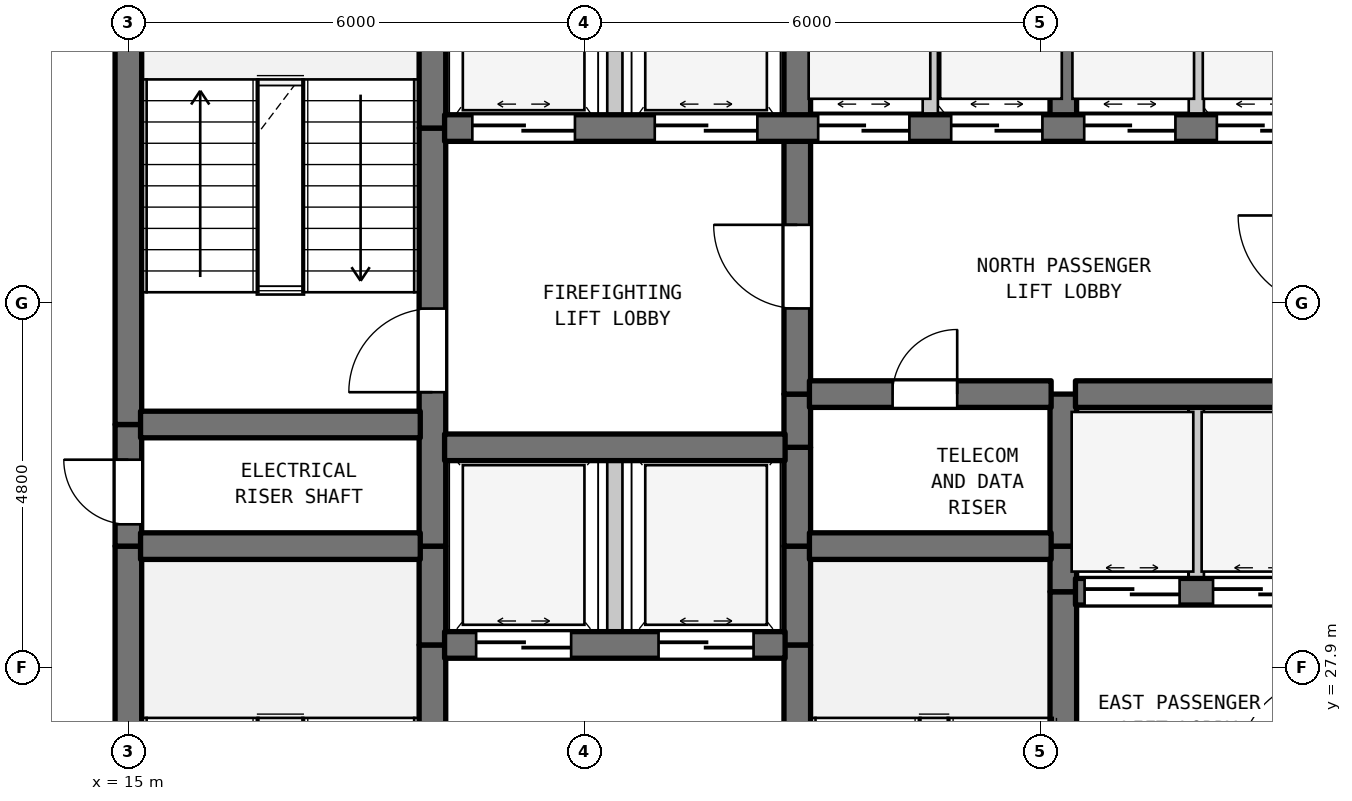
"""IFC4 building model, lengths in metres.
Left out: names, types, materials, properties, quantities, classifications, styles, units other than length and angle.
Written with IfcOpenShell. Run it as: python <this file> out.ifc"""

import sys

from ifc_helpers import new_model, si_unit, direction, frame, frame_2d, origin, place, context, subcontext, project, spatial, rectangle, extrude, element, fill, save


model = new_model("IFC4")
c1 = context("Model", 3, precision=1e-05, world=origin(), true_north=direction((0.0, 1.0)))
c2 = subcontext(c1, "Body", "Model", "MODEL_VIEW")
j1 = project(units=[si_unit("LENGTHUNIT", "METRE"), si_unit("PLANEANGLEUNIT", "RADIAN")], contexts=[c1])
p1 = place(None, origin())
s1 = spatial("IfcSite", under=j1, at=p1, CompositionType="ELEMENT")
p2 = place(p1, origin())
s2 = spatial("IfcBuilding", under=s1, at=p2, CompositionType="ELEMENT")
p3 = place(p2, frame((0.0, 0.0, 57.3)))
s3 = spatial("IfcBuildingStorey", under=s2, at=p3, CompositionType="ELEMENT", Elevation=57.3)
p4 = place(p3, frame((15.0, 22.7, 0.0), z_axis=(0.0, 0.0, 1.0), x_axis=(0.0, 1.0, 0.0)))
e1 = element("IfcWall", 1, at=p4, inside=s3, PredefinedType="SHEAR", context=c2, shape_type="SweptSolid", body=[
    extrude(rectangle(XDim=6.8, YDim=0.35, at=frame_2d((3.4, 0.0))), origin(), (0.0, 0.0, 1.0), 3.28),
])
p5 = place(p3, frame((15.0, 29.5, 0.0), z_axis=(0.0, 0.0, 1.0), x_axis=(0.0, 1.0, 0.0)))
e2 = element("IfcWall", 2, at=p5, inside=s3, PredefinedType="SHEAR", context=c2, shape_type="SweptSolid", body=[
    extrude(rectangle(XDim=1.6, YDim=0.35, at=frame_2d((0.8, 0.0))), origin(), (0.0, 0.0, 1.0), 3.28),
])
p6 = place(p5, frame((0.287, 0.0, 0.0)))
e3 = element("IfcOpeningElement", 3, at=p6, cuts=e2, PredefinedType="OPENING", context=c2, shape_type="SweptSolid", body=[
    extrude(rectangle(XDim=0.85, YDim=2.1, at=frame_2d((0.425, 1.05))), frame((0.0, 0.185, 0.0), z_axis=(0.0, -1.0, 0.0), x_axis=(1.0, 0.0, 0.0)), (0.0, 0.0, 1.0), 0.37),
])
p7 = place(p3, frame((15.0, 31.1, 0.0), z_axis=(0.0, 0.0, 1.0), x_axis=(0.0, 1.0, 0.0)))
e4 = element("IfcWall", 4, at=p7, inside=s3, PredefinedType="SHEAR", context=c2, shape_type="SweptSolid", body=[
    extrude(rectangle(XDim=6.8, YDim=0.35, at=frame_2d((3.4, 0.0))), origin(), (0.0, 0.0, 1.0), 3.28),
])
p8 = place(p3, frame((19.0, 22.7, 0.0), z_axis=(0.0, 0.0, 1.0), x_axis=(0.0, 1.0, 0.0)))
e5 = element("IfcWall", 5, at=p8, inside=s3, PredefinedType="SHEAR", context=c2, shape_type="SweptSolid", body=[
    extrude(rectangle(XDim=5.5, YDim=0.35, at=frame_2d((2.75, 0.0))), origin(), (0.0, 0.0, 1.0), 3.28),
])
p9 = place(p8, frame((0.631, 0.0, 0.0)))
e6 = element("IfcOpeningElement", 6, at=p9, cuts=e5, PredefinedType="OPENING", context=c2, shape_type="SweptSolid", body=[
    extrude(rectangle(XDim=1.1, YDim=2.15, at=frame_2d((0.55, 1.075))), frame((0.0, 0.185, 0.0), z_axis=(0.0, -1.0, 0.0), x_axis=(1.0, 0.0, 0.0)), (0.0, 0.0, 1.0), 0.37),
])
p10 = place(p3, frame((19.0, 28.2, 0.0), z_axis=(0.0, 0.0, 1.0), x_axis=(0.0, 1.0, 0.0)))
e7 = element("IfcWall", 7, at=p10, inside=s3, PredefinedType="SHEAR", context=c2, shape_type="SweptSolid", body=[
    extrude(rectangle(XDim=1.3, YDim=0.35, at=frame_2d((0.65, 0.0))), origin(), (0.0, 0.0, 1.0), 3.28),
])
p11 = place(p3, frame((19.0, 29.5, 0.0), z_axis=(0.0, 0.0, 1.0), x_axis=(0.0, 1.0, 0.0)))
e8 = element("IfcWall", 8, at=p11, inside=s3, PredefinedType="SHEAR", context=c2, shape_type="SweptSolid", body=[
    extrude(rectangle(XDim=5.5, YDim=0.35, at=frame_2d((2.75, 0.0))), origin(), (0.0, 0.0, 1.0), 3.28),
])
p12 = place(p11, frame((2.025, 0.0, 0.0)))
e9 = element("IfcOpeningElement", 9, at=p12, cuts=e8, PredefinedType="OPENING", context=c2, shape_type="SweptSolid", body=[
    extrude(rectangle(XDim=1.1, YDim=2.15, at=frame_2d((0.55, 1.075))), frame((0.0, 0.185, 0.0), z_axis=(0.0, -1.0, 0.0), x_axis=(1.0, 0.0, 0.0)), (0.0, 0.0, 1.0), 0.37),
])
p13 = place(p3, frame((19.0, 35.0, 0.0), z_axis=(0.0, 0.0, 1.0), x_axis=(0.0, 1.0, 0.0)))
e10 = element("IfcWall", 10, at=p13, inside=s3, PredefinedType="SHEAR", context=c2, shape_type="SweptSolid", body=[
    extrude(rectangle(XDim=2.9, YDim=0.35, at=frame_2d((1.45, 0.0))), origin(), (0.0, 0.0, 1.0), 3.28),
])
p14 = place(p3, frame((21.4, 28.2, 0.0), z_axis=(0.0, 0.0, 1.0), x_axis=(0.0, 1.0, 0.0)))
e11 = element("IfcWall", 11, at=p14, inside=s3, PredefinedType="STANDARD", context=c2, shape_type="SweptSolid", body=[
    extrude(rectangle(XDim=2.6, YDim=0.2, at=frame_2d((1.3, 0.0))), origin(), (0.0, 0.0, 1.0), 3.28),
])
p15 = place(p3, frame((21.4, 35.0, 0.0), z_axis=(0.0, 0.0, 1.0), x_axis=(0.0, 1.0, 0.0)))
e12 = element("IfcWall", 12, at=p15, inside=s3, PredefinedType="STANDARD", context=c2, shape_type="SweptSolid", body=[
    extrude(rectangle(XDim=2.9, YDim=0.2, at=frame_2d((1.45, 0.0))), origin(), (0.0, 0.0, 1.0), 3.28),
])
p16 = place(p3, frame((23.8, 22.7, 0.0), z_axis=(0.0, 0.0, 1.0), x_axis=(0.0, 1.0, 0.0)))
e13 = element("IfcWall", 13, at=p16, inside=s3, PredefinedType="SHEAR", context=c2, shape_type="SweptSolid", body=[
    extrude(rectangle(XDim=5.5, YDim=0.35, at=frame_2d((2.75, 0.0))), origin(), (0.0, 0.0, 1.0), 3.28),
])
p17 = place(p16, frame((0.235, 0.0, 0.0)))
e14 = element("IfcOpeningElement", 14, at=p17, cuts=e13, PredefinedType="OPENING", context=c2, shape_type="SweptSolid", body=[
    extrude(rectangle(XDim=1.1, YDim=2.15, at=frame_2d((0.55, 1.075))), frame((0.0, 0.185, 0.0), z_axis=(0.0, -1.0, 0.0), x_axis=(1.0, 0.0, 0.0)), (0.0, 0.0, 1.0), 0.37),
])
for number, where, z_axis, x_axis in (
    (15, (23.8, 28.2, 0.0), (0.0, 0.0, 1.0), (0.0, 1.0, 0.0)),
    (16, (23.8, 29.5, 0.0), (0.0, 0.0, 1.0), (0.0, 1.0, 0.0)),
):
    element("IfcWall", number, at=place(p3, frame(where, z_axis=z_axis, x_axis=x_axis)), inside=s3, PredefinedType="SHEAR", context=c2, shape_type="SweptSolid", body=[
        extrude(rectangle(XDim=1.3, YDim=0.35, at=frame_2d((0.65, 0.0))), origin(), (0.0, 0.0, 1.0), 3.28),
    ])
p18 = place(p3, frame((23.8, 30.8, 0.0), z_axis=(0.0, 0.0, 1.0), x_axis=(0.0, 1.0, 0.0)))
e17 = element("IfcWall", 17, at=p18, inside=s3, PredefinedType="SHEAR", context=c2, shape_type="SweptSolid", body=[
    extrude(rectangle(XDim=0.7, YDim=0.35, at=frame_2d((0.35, 0.0))), origin(), (0.0, 0.0, 1.0), 3.28),
])
p19 = place(p3, frame((23.8, 31.5, 0.0), z_axis=(0.0, 0.0, 1.0), x_axis=(0.0, 1.0, 0.0)))
e18 = element("IfcWall", 18, at=p19, inside=s3, PredefinedType="SHEAR", context=c2, shape_type="SweptSolid", body=[
    extrude(rectangle(XDim=3.5, YDim=0.35, at=frame_2d((1.75, 0.0))), origin(), (0.0, 0.0, 1.0), 3.28),
])
p20 = place(p19, frame((1.127, 0.0, 0.0)))
e19 = element("IfcOpeningElement", 19, at=p20, cuts=e18, PredefinedType="OPENING", context=c2, shape_type="SweptSolid", body=[
    extrude(rectangle(XDim=1.1, YDim=2.15, at=frame_2d((0.55, 1.075))), frame((0.0, 0.185, 0.0), z_axis=(0.0, -1.0, 0.0), x_axis=(1.0, 0.0, 0.0)), (0.0, 0.0, 1.0), 0.37),
])
p21 = place(p3, frame((23.8, 35.0, 0.0), z_axis=(0.0, 0.0, 1.0), x_axis=(0.0, 1.0, 0.0)))
e20 = element("IfcWall", 20, at=p21, inside=s3, PredefinedType="SHEAR", context=c2, shape_type="SweptSolid", body=[
    extrude(rectangle(XDim=2.9, YDim=0.35, at=frame_2d((1.45, 0.0))), origin(), (0.0, 0.0, 1.0), 3.28),
])
p22 = place(p3, frame((25.55, 35.0, 0.0), z_axis=(0.0, 0.0, 1.0), x_axis=(0.0, 1.0, 0.0)))
e21 = element("IfcWall", 21, at=p22, inside=s3, PredefinedType="STANDARD", context=c2, shape_type="SweptSolid", body=[
    extrude(rectangle(XDim=2.9, YDim=0.2, at=frame_2d((1.45, 0.0))), origin(), (0.0, 0.0, 1.0), 3.28),
])
p23 = place(p3, frame((27.3, 25.6, 0.0), z_axis=(0.0, 0.0, 1.0), x_axis=(0.0, 1.0, 0.0)))
e22 = element("IfcWall", 22, at=p23, inside=s3, PredefinedType="SHEAR", context=c2, shape_type="SweptSolid", body=[
    extrude(rectangle(XDim=3.3, YDim=0.35, at=frame_2d((1.65, 0.0))), origin(), (0.0, 0.0, 1.0), 3.28),
])
p24 = place(p3, frame((27.3, 28.9, 0.0), z_axis=(0.0, 0.0, 1.0), x_axis=(0.0, 1.0, 0.0)))
e23 = element("IfcWall", 23, at=p24, inside=s3, PredefinedType="SHEAR", context=c2, shape_type="SweptSolid", body=[
    extrude(rectangle(XDim=0.6, YDim=0.35, at=frame_2d((0.3, 0.0))), origin(), (0.0, 0.0, 1.0), 3.28),
])
p25 = place(p3, frame((27.3, 29.5, 0.0), z_axis=(0.0, 0.0, 1.0), x_axis=(0.0, 1.0, 0.0)))
e24 = element("IfcWall", 24, at=p25, inside=s3, PredefinedType="SHEAR", context=c2, shape_type="SweptSolid", body=[
    extrude(rectangle(XDim=2.0, YDim=0.35, at=frame_2d((1.0, 0.0))), origin(), (0.0, 0.0, 1.0), 3.28),
])
p26 = place(p3, frame((27.3, 35.0, 0.0), z_axis=(0.0, 0.0, 1.0), x_axis=(0.0, 1.0, 0.0)))
e25 = element("IfcWall", 25, at=p26, inside=s3, PredefinedType="SHEAR", context=c2, shape_type="SweptSolid", body=[
    extrude(rectangle(XDim=2.9, YDim=0.35, at=frame_2d((1.45, 0.0))), origin(), (0.0, 0.0, 1.0), 3.28),
])
p27 = place(p3, frame((29.05, 28.9, 0.0), z_axis=(0.0, 0.0, 1.0), x_axis=(0.0, 1.0, 0.0)))
e26 = element("IfcWall", 26, at=p27, inside=s3, PredefinedType="STANDARD", context=c2, shape_type="SweptSolid", body=[
    extrude(rectangle(XDim=2.6, YDim=0.2, at=frame_2d((1.3, 0.0))), origin(), (0.0, 0.0, 1.0), 3.28),
])
p28 = place(p3, frame((29.05, 35.0, 0.0), z_axis=(0.0, 0.0, 1.0), x_axis=(0.0, 1.0, 0.0)))
e27 = element("IfcWall", 27, at=p28, inside=s3, PredefinedType="STANDARD", context=c2, shape_type="SweptSolid", body=[
    extrude(rectangle(XDim=2.9, YDim=0.2, at=frame_2d((1.45, 0.0))), origin(), (0.0, 0.0, 1.0), 3.28),
])
p29 = place(p3, frame((19.16, 28.2, 0.0), z_axis=(0.0, 0.0, 1.0), x_axis=(1.0, 0.0, 0.0)))
e28 = element("IfcWall", 28, at=p29, inside=s3, PredefinedType="SHEAR", context=c2, shape_type="SweptSolid", body=[
    extrude(rectangle(XDim=4.48, YDim=0.35, at=frame_2d((2.24, 0.0))), origin(), (0.0, 0.0, 1.0), 3.28),
])
p30 = place(p29, frame((0.415, 0.0, 0.0)))
e29 = element("IfcOpeningElement", 29, at=p30, cuts=e28, PredefinedType="OPENING", context=c2, shape_type="SweptSolid", body=[
    extrude(rectangle(XDim=1.25, YDim=2.2, at=frame_2d((0.625, 1.1))), frame((0.0, 0.185, 0.0), z_axis=(0.0, -1.0, 0.0), x_axis=(1.0, 0.0, 0.0)), (0.0, 0.0, 1.0), 0.37),
])
p31 = place(p29, frame((2.815, 0.0, 0.0)))
e30 = element("IfcOpeningElement", 30, at=p31, cuts=e28, PredefinedType="OPENING", context=c2, shape_type="SweptSolid", body=[
    extrude(rectangle(XDim=1.25, YDim=2.2, at=frame_2d((0.625, 1.1))), frame((0.0, 0.185, 0.0), z_axis=(0.0, -1.0, 0.0), x_axis=(1.0, 0.0, 0.0)), (0.0, 0.0, 1.0), 0.37),
])
p32 = place(p3, frame((27.46, 28.9, 0.0), z_axis=(0.0, 0.0, 1.0), x_axis=(1.0, 0.0, 0.0)))
e31 = element("IfcWall", 31, at=p32, inside=s3, PredefinedType="SHEAR", context=c2, shape_type="SweptSolid", body=[
    extrude(rectangle(XDim=3.18, YDim=0.35, at=frame_2d((1.59, 0.0))), origin(), (0.0, 0.0, 1.0), 3.28),
])
p33 = place(p32, frame((0.12, 0.0, 0.0)))
e32 = element("IfcOpeningElement", 32, at=p33, cuts=e31, PredefinedType="OPENING", context=c2, shape_type="SweptSolid", body=[
    extrude(rectangle(XDim=1.25, YDim=2.2, at=frame_2d((0.625, 1.1))), frame((0.0, 0.185, 0.0), z_axis=(0.0, -1.0, 0.0), x_axis=(1.0, 0.0, 0.0)), (0.0, 0.0, 1.0), 0.37),
])
p34 = place(p32, frame((1.81, 0.0, 0.0)))
e33 = element("IfcOpeningElement", 33, at=p34, cuts=e31, PredefinedType="OPENING", context=c2, shape_type="SweptSolid", body=[
    extrude(rectangle(XDim=1.25, YDim=2.2, at=frame_2d((0.625, 1.1))), frame((0.0, 0.185, 0.0), z_axis=(0.0, -1.0, 0.0), x_axis=(1.0, 0.0, 0.0)), (0.0, 0.0, 1.0), 0.37),
])
p35 = place(p3, frame((15.16, 29.5, 0.0), z_axis=(0.0, 0.0, 1.0), x_axis=(1.0, 0.0, 0.0)))
e34 = element("IfcWall", 34, at=p35, inside=s3, PredefinedType="SHEAR", context=c2, shape_type="SweptSolid", body=[
    extrude(rectangle(XDim=3.68, YDim=0.35, at=frame_2d((1.84, 0.0))), origin(), (0.0, 0.0, 1.0), 3.28),
])
p36 = place(p3, frame((23.96, 29.5, 0.0), z_axis=(0.0, 0.0, 1.0), x_axis=(1.0, 0.0, 0.0)))
e35 = element("IfcWall", 35, at=p36, inside=s3, PredefinedType="SHEAR", context=c2, shape_type="SweptSolid", body=[
    extrude(rectangle(XDim=3.18, YDim=0.35, at=frame_2d((1.59, 0.0))), origin(), (0.0, 0.0, 1.0), 3.28),
])
p37 = place(p3, frame((19.16, 30.8, 0.0), z_axis=(0.0, 0.0, 1.0), x_axis=(1.0, 0.0, 0.0)))
e36 = element("IfcWall", 36, at=p37, inside=s3, PredefinedType="SHEAR", context=c2, shape_type="SweptSolid", body=[
    extrude(rectangle(XDim=4.48, YDim=0.35, at=frame_2d((2.24, 0.0))), origin(), (0.0, 0.0, 1.0), 3.28),
])
p38 = place(p3, frame((15.16, 31.1, 0.0), z_axis=(0.0, 0.0, 1.0), x_axis=(1.0, 0.0, 0.0)))
e37 = element("IfcWall", 37, at=p38, inside=s3, PredefinedType="SHEAR", context=c2, shape_type="SweptSolid", body=[
    extrude(rectangle(XDim=3.68, YDim=0.35, at=frame_2d((1.84, 0.0))), origin(), (0.0, 0.0, 1.0), 3.28),
])
p39 = place(p3, frame((23.96, 31.5, 0.0), z_axis=(0.0, 0.0, 1.0), x_axis=(1.0, 0.0, 0.0)))
e38 = element("IfcWall", 38, at=p39, inside=s3, PredefinedType="SHEAR", context=c2, shape_type="SweptSolid", body=[
    extrude(rectangle(XDim=3.18, YDim=0.35, at=frame_2d((1.59, 0.0))), origin(), (0.0, 0.0, 1.0), 3.28),
])
p40 = place(p39, frame((1.094, 0.0, 0.0)))
e39 = element("IfcOpeningElement", 39, at=p40, cuts=e38, PredefinedType="OPENING", context=c2, shape_type="SweptSolid", body=[
    extrude(rectangle(XDim=0.85, YDim=2.1, at=frame_2d((0.425, 1.05))), frame((0.0, 0.185, 0.0), z_axis=(0.0, -1.0, 0.0), x_axis=(1.0, 0.0, 0.0)), (0.0, 0.0, 1.0), 0.37),
])
p41 = place(p3, frame((27.46, 31.5, 0.0), z_axis=(0.0, 0.0, 1.0), x_axis=(1.0, 0.0, 0.0)))
e40 = element("IfcWall", 40, at=p41, inside=s3, PredefinedType="SHEAR", context=c2, shape_type="SweptSolid", body=[
    extrude(rectangle(XDim=3.18, YDim=0.35, at=frame_2d((1.59, 0.0))), origin(), (0.0, 0.0, 1.0), 3.28),
])
p42 = place(p3, frame((19.16, 35.0, 0.0), z_axis=(0.0, 0.0, 1.0), x_axis=(1.0, 0.0, 0.0)))
e41 = element("IfcWall", 41, at=p42, inside=s3, PredefinedType="SHEAR", context=c2, shape_type="SweptSolid", body=[
    extrude(rectangle(XDim=11.48, YDim=0.35, at=frame_2d((5.74, 0.0))), origin(), (0.0, 0.0, 1.0), 3.28),
])
p43 = place(p42, frame((0.365, 0.0, 0.0)))
e42 = element("IfcOpeningElement", 42, at=p43, cuts=e41, PredefinedType="OPENING", context=c2, shape_type="SweptSolid", body=[
    extrude(rectangle(XDim=1.35, YDim=2.2, at=frame_2d((0.675, 1.1))), frame((0.0, 0.185, 0.0), z_axis=(0.0, -1.0, 0.0), x_axis=(1.0, 0.0, 0.0)), (0.0, 0.0, 1.0), 0.37),
])
p44 = place(p42, frame((2.765, 0.0, 0.0)))
e43 = element("IfcOpeningElement", 43, at=p44, cuts=e41, PredefinedType="OPENING", context=c2, shape_type="SweptSolid", body=[
    extrude(rectangle(XDim=1.35, YDim=2.2, at=frame_2d((0.675, 1.1))), frame((0.0, 0.185, 0.0), z_axis=(0.0, -1.0, 0.0), x_axis=(1.0, 0.0, 0.0)), (0.0, 0.0, 1.0), 0.37),
])
p45 = place(p42, frame((4.915, 0.0, 0.0)))
e44 = element("IfcOpeningElement", 44, at=p45, cuts=e41, PredefinedType="OPENING", context=c2, shape_type="SweptSolid", body=[
    extrude(rectangle(XDim=1.2, YDim=2.2, at=frame_2d((0.6, 1.1))), frame((0.0, 0.185, 0.0), z_axis=(0.0, -1.0, 0.0), x_axis=(1.0, 0.0, 0.0)), (0.0, 0.0, 1.0), 0.37),
])
p46 = place(p42, frame((6.665, 0.0, 0.0)))
e45 = element("IfcOpeningElement", 45, at=p46, cuts=e41, PredefinedType="OPENING", context=c2, shape_type="SweptSolid", body=[
    extrude(rectangle(XDim=1.2, YDim=2.2, at=frame_2d((0.6, 1.1))), frame((0.0, 0.185, 0.0), z_axis=(0.0, -1.0, 0.0), x_axis=(1.0, 0.0, 0.0)), (0.0, 0.0, 1.0), 0.37),
])
p47 = place(p42, frame((8.415, 0.0, 0.0)))
e46 = element("IfcOpeningElement", 46, at=p47, cuts=e41, PredefinedType="OPENING", context=c2, shape_type="SweptSolid", body=[
    extrude(rectangle(XDim=1.2, YDim=2.2, at=frame_2d((0.6, 1.1))), frame((0.0, 0.185, 0.0), z_axis=(0.0, -1.0, 0.0), x_axis=(1.0, 0.0, 0.0)), (0.0, 0.0, 1.0), 0.37),
])
p48 = place(p42, frame((10.16, 0.0, 0.0)))
e47 = element("IfcOpeningElement", 47, at=p48, cuts=e41, PredefinedType="OPENING", context=c2, shape_type="SweptSolid", body=[
    extrude(rectangle(XDim=1.2, YDim=2.2, at=frame_2d((0.6, 1.1))), frame((0.0, 0.185, 0.0), z_axis=(0.0, -1.0, 0.0), x_axis=(1.0, 0.0, 0.0)), (0.0, 0.0, 1.0), 0.37),
])
p49 = place(p6, origin())
e48 = element("IfcDoor", 48, at=p49, inside=s3, OperationType="SINGLE_SWING_RIGHT", PredefinedType="DOOR", context=c2, shape_type="SweptSolid", body=[
    extrude(rectangle(XDim=0.85, YDim=2.1, at=frame_2d((0.425, 1.05))), frame((0.0, 0.025, 0.0), z_axis=(0.0, -1.0, 0.0), x_axis=(1.0, 0.0, 0.0)), (0.0, 0.0, 1.0), 0.05),
])
fill(e3, e48)
p50 = place(p12, origin())
e49 = element("IfcDoor", 49, at=p50, inside=s3, OperationType="SINGLE_SWING_LEFT", PredefinedType="DOOR", context=c2, shape_type="SweptSolid", body=[
    extrude(rectangle(XDim=1.1, YDim=2.15, at=frame_2d((0.55, 1.075))), frame((0.0, 0.025, 0.0), z_axis=(0.0, -1.0, 0.0), x_axis=(1.0, 0.0, 0.0)), (0.0, 0.0, 1.0), 0.05),
])
fill(e9, e49)
p51 = place(p20, origin())
e50 = element("IfcDoor", 50, at=p51, inside=s3, OperationType="SINGLE_SWING_RIGHT", PredefinedType="DOOR", context=c2, shape_type="SweptSolid", body=[
    extrude(rectangle(XDim=1.1, YDim=2.15, at=frame_2d((0.55, 1.075))), frame((0.0, 0.025, 0.0), z_axis=(0.0, -1.0, 0.0), x_axis=(1.0, 0.0, 0.0)), (0.0, 0.0, 1.0), 0.05),
])
fill(e19, e50)
p52 = place(p30, origin())
e51 = element("IfcDoor", 51, at=p52, inside=s3, OperationType="DOUBLE_DOOR_SLIDING", PredefinedType="DOOR", context=c2, shape_type="SweptSolid", body=[
    extrude(rectangle(XDim=1.25, YDim=2.2, at=frame_2d((0.625, 1.1))), frame((0.0, 0.025, 0.0), z_axis=(0.0, -1.0, 0.0), x_axis=(1.0, 0.0, 0.0)), (0.0, 0.0, 1.0), 0.05),
])
fill(e29, e51)
p53 = place(p31, origin())
e52 = element("IfcDoor", 52, at=p53, inside=s3, OperationType="DOUBLE_DOOR_SLIDING", PredefinedType="DOOR", context=c2, shape_type="SweptSolid", body=[
    extrude(rectangle(XDim=1.25, YDim=2.2, at=frame_2d((0.625, 1.1))), frame((0.0, 0.025, 0.0), z_axis=(0.0, -1.0, 0.0), x_axis=(1.0, 0.0, 0.0)), (0.0, 0.0, 1.0), 0.05),
])
fill(e30, e52)
p54 = place(p33, origin())
e53 = element("IfcDoor", 53, at=p54, inside=s3, OperationType="DOUBLE_DOOR_SLIDING", PredefinedType="DOOR", context=c2, shape_type="SweptSolid", body=[
    extrude(rectangle(XDim=1.25, YDim=2.2, at=frame_2d((0.625, 1.1))), frame((0.0, 0.025, 0.0), z_axis=(0.0, -1.0, 0.0), x_axis=(1.0, 0.0, 0.0)), (0.0, 0.0, 1.0), 0.05),
])
fill(e32, e53)
p55 = place(p34, origin())
e54 = element("IfcDoor", 54, at=p55, inside=s3, OperationType="DOUBLE_DOOR_SLIDING", PredefinedType="DOOR", context=c2, shape_type="SweptSolid", body=[
    extrude(rectangle(XDim=1.25, YDim=2.2, at=frame_2d((0.625, 1.1))), frame((0.0, 0.025, 0.0), z_axis=(0.0, -1.0, 0.0), x_axis=(1.0, 0.0, 0.0)), (0.0, 0.0, 1.0), 0.05),
])
fill(e33, e54)
p56 = place(p40, origin())
e55 = element("IfcDoor", 55, at=p56, inside=s3, OperationType="SINGLE_SWING_RIGHT", PredefinedType="DOOR", context=c2, shape_type="SweptSolid", body=[
    extrude(rectangle(XDim=0.85, YDim=2.1, at=frame_2d((0.425, 1.05))), frame((0.0, 0.025, 0.0), z_axis=(0.0, -1.0, 0.0), x_axis=(1.0, 0.0, 0.0)), (0.0, 0.0, 1.0), 0.05),
])
fill(e39, e55)
p57 = place(p43, origin())
e56 = element("IfcDoor", 56, at=p57, inside=s3, OperationType="DOUBLE_DOOR_SLIDING", PredefinedType="DOOR", context=c2, shape_type="SweptSolid", body=[
    extrude(rectangle(XDim=1.35, YDim=2.2, at=frame_2d((0.675, 1.1))), frame((0.0, 0.025, 0.0), z_axis=(0.0, -1.0, 0.0), x_axis=(1.0, 0.0, 0.0)), (0.0, 0.0, 1.0), 0.05),
])
fill(e42, e56)
p58 = place(p44, origin())
e57 = element("IfcDoor", 57, at=p58, inside=s3, OperationType="DOUBLE_DOOR_SLIDING", PredefinedType="DOOR", context=c2, shape_type="SweptSolid", body=[
    extrude(rectangle(XDim=1.35, YDim=2.2, at=frame_2d((0.675, 1.1))), frame((0.0, 0.025, 0.0), z_axis=(0.0, -1.0, 0.0), x_axis=(1.0, 0.0, 0.0)), (0.0, 0.0, 1.0), 0.05),
])
fill(e43, e57)
p59 = place(p45, origin())
e58 = element("IfcDoor", 58, at=p59, inside=s3, OperationType="DOUBLE_DOOR_SLIDING", PredefinedType="DOOR", context=c2, shape_type="SweptSolid", body=[
    extrude(rectangle(XDim=1.2, YDim=2.2, at=frame_2d((0.6, 1.1))), frame((0.0, 0.025, 0.0), z_axis=(0.0, -1.0, 0.0), x_axis=(1.0, 0.0, 0.0)), (0.0, 0.0, 1.0), 0.05),
])
fill(e44, e58)
p60 = place(p46, origin())
e59 = element("IfcDoor", 59, at=p60, inside=s3, OperationType="DOUBLE_DOOR_SLIDING", PredefinedType="DOOR", context=c2, shape_type="SweptSolid", body=[
    extrude(rectangle(XDim=1.2, YDim=2.2, at=frame_2d((0.6, 1.1))), frame((0.0, 0.025, 0.0), z_axis=(0.0, -1.0, 0.0), x_axis=(1.0, 0.0, 0.0)), (0.0, 0.0, 1.0), 0.05),
])
fill(e45, e59)
p61 = place(p47, origin())
e60 = element("IfcDoor", 60, at=p61, inside=s3, OperationType="DOUBLE_DOOR_SLIDING", PredefinedType="DOOR", context=c2, shape_type="SweptSolid", body=[
    extrude(rectangle(XDim=1.2, YDim=2.2, at=frame_2d((0.6, 1.1))), frame((0.0, 0.025, 0.0), z_axis=(0.0, -1.0, 0.0), x_axis=(1.0, 0.0, 0.0)), (0.0, 0.0, 1.0), 0.05),
])
fill(e46, e60)
p62 = place(p48, origin())
e61 = element("IfcDoor", 61, at=p62, inside=s3, OperationType="DOUBLE_DOOR_SLIDING", PredefinedType="DOOR", context=c2, shape_type="SweptSolid", body=[
    extrude(rectangle(XDim=1.2, YDim=2.2, at=frame_2d((0.6, 1.1))), frame((0.0, 0.025, 0.0), z_axis=(0.0, -1.0, 0.0), x_axis=(1.0, 0.0, 0.0)), (0.0, 0.0, 1.0), 0.05),
])
fill(e47, e61)
save(model, sys.argv[1])
